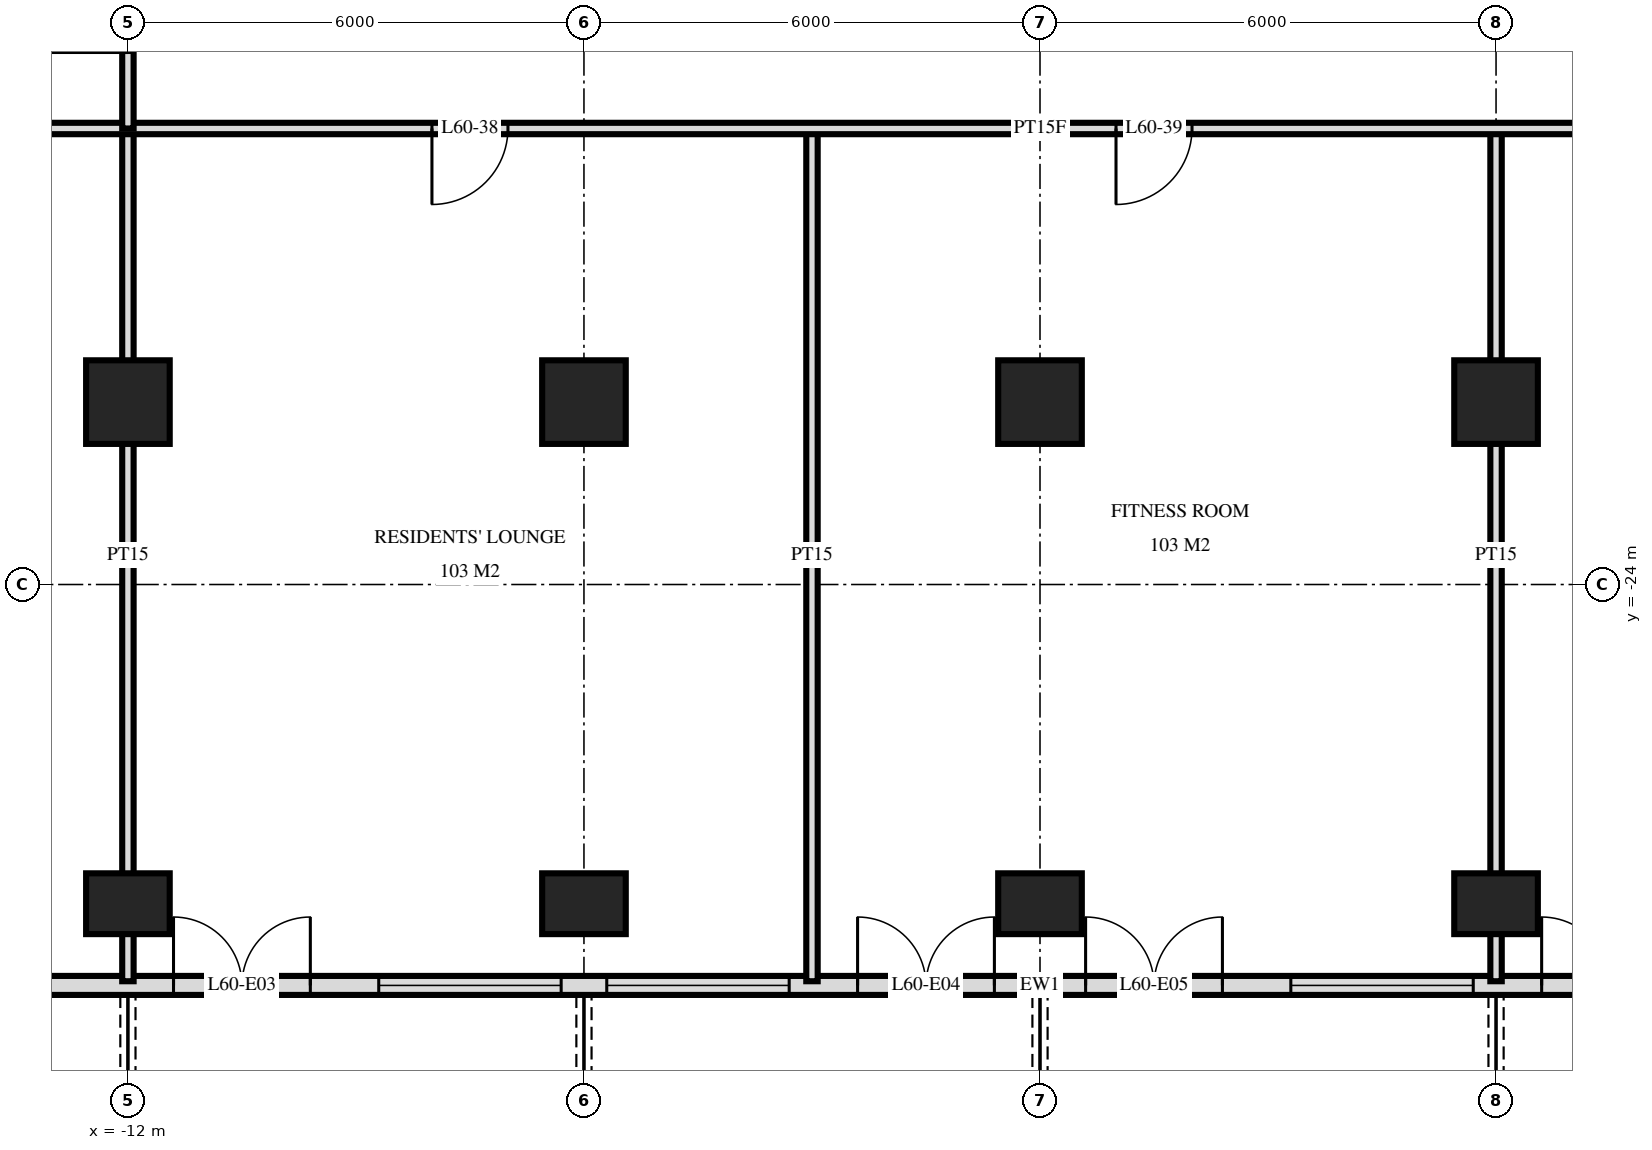
"""IFC4 building model, lengths in metres.
Left out: names, types, materials, properties, quantities, classifications, styles, units other than length and angle.
Written with IfcOpenShell. Run it as: python <this file> out.ifc"""

import sys

from ifc_helpers import new_model, si_unit, direction, frame, frame_2d, origin, origin_2d, place, context, subcontext, project, spatial, rectangle, extrude, element, fill, save


model = new_model("IFC4")
c1 = context("Model", 3, precision=1e-05, world=origin(), true_north=direction((0.0, 1.0)))
c2 = subcontext(c1, "Body", "Model", "MODEL_VIEW")
j1 = project(units=[si_unit("LENGTHUNIT", "METRE"), si_unit("PLANEANGLEUNIT", "RADIAN")], contexts=[c1])
p1 = place(None, origin())
s1 = spatial("IfcSite", under=j1, at=p1, CompositionType="ELEMENT")
p2 = place(p1, origin())
s2 = spatial("IfcBuilding", under=s1, at=p2, CompositionType="ELEMENT")
p3 = place(p2, frame((0.0, 0.0, 229.1)))
s3 = spatial("IfcBuildingStorey", under=s2, at=p3, CompositionType="ELEMENT", Elevation=229.1)
p4 = place(p3, frame((-12.0, -28.2, 0.0), z_axis=(0.0, 0.0, 1.0), x_axis=(1.0, 0.0, 0.0)))
e1 = element("IfcColumn", 1, at=p4, inside=s3, PredefinedType="COLUMN", context=c2, shape_type="SweptSolid", body=[
    extrude(rectangle(XDim=1.1, YDim=0.8, at=origin_2d()), origin(), (0.0, 0.0, 1.0), 3.5),
])
p5 = place(p3, frame((-12.0, -21.6, 0.0), z_axis=(0.0, 0.0, 1.0), x_axis=(1.0, 0.0, 0.0)))
e2 = element("IfcColumn", 2, at=p5, inside=s3, PredefinedType="COLUMN", context=c2, shape_type="SweptSolid", body=[
    extrude(rectangle(XDim=1.1, YDim=1.1, at=origin_2d()), origin(), (0.0, 0.0, 1.0), 3.5),
])
p6 = place(p3, frame((-6.0, -28.2, 0.0), z_axis=(0.0, 0.0, 1.0), x_axis=(1.0, 0.0, 0.0)))
e3 = element("IfcColumn", 3, at=p6, inside=s3, PredefinedType="COLUMN", context=c2, shape_type="SweptSolid", body=[
    extrude(rectangle(XDim=1.1, YDim=0.8, at=origin_2d()), origin(), (0.0, 0.0, 1.0), 3.5),
])
p7 = place(p3, frame((-6.0, -21.6, 0.0), z_axis=(0.0, 0.0, 1.0), x_axis=(1.0, 0.0, 0.0)))
e4 = element("IfcColumn", 4, at=p7, inside=s3, PredefinedType="COLUMN", context=c2, shape_type="SweptSolid", body=[
    extrude(rectangle(XDim=1.1, YDim=1.1, at=origin_2d()), origin(), (0.0, 0.0, 1.0), 3.5),
])
p8 = place(p3, frame((0.0, -28.2, 0.0), z_axis=(0.0, 0.0, 1.0), x_axis=(1.0, 0.0, 0.0)))
e5 = element("IfcColumn", 5, at=p8, inside=s3, PredefinedType="COLUMN", context=c2, shape_type="SweptSolid", body=[
    extrude(rectangle(XDim=1.1, YDim=0.8, at=origin_2d()), origin(), (0.0, 0.0, 1.0), 3.5),
])
p9 = place(p3, frame((0.0, -21.6, 0.0), z_axis=(0.0, 0.0, 1.0), x_axis=(1.0, 0.0, 0.0)))
e6 = element("IfcColumn", 6, at=p9, inside=s3, PredefinedType="COLUMN", context=c2, shape_type="SweptSolid", body=[
    extrude(rectangle(XDim=1.1, YDim=1.1, at=origin_2d()), origin(), (0.0, 0.0, 1.0), 3.5),
])
p10 = place(p3, frame((6.0, -28.2, 0.0), z_axis=(0.0, 0.0, 1.0), x_axis=(1.0, 0.0, 0.0)))
e7 = element("IfcColumn", 7, at=p10, inside=s3, PredefinedType="COLUMN", context=c2, shape_type="SweptSolid", body=[
    extrude(rectangle(XDim=1.1, YDim=0.8, at=origin_2d()), origin(), (0.0, 0.0, 1.0), 3.5),
])
p11 = place(p3, frame((6.0, -21.6, 0.0), z_axis=(0.0, 0.0, 1.0), x_axis=(1.0, 0.0, 0.0)))
e8 = element("IfcColumn", 8, at=p11, inside=s3, PredefinedType="COLUMN", context=c2, shape_type="SweptSolid", body=[
    extrude(rectangle(XDim=1.1, YDim=1.1, at=origin_2d()), origin(), (0.0, 0.0, 1.0), 3.5),
])
p12 = place(p3, frame((-22.475, -29.275, 0.0), z_axis=(0.0, 0.0, 1.0), x_axis=(1.0, 0.0, 0.0)))
e9 = element("IfcWall", 9, at=p12, inside=s3, PredefinedType="SOLIDWALL", context=c2, shape_type="SweptSolid", body=[
    extrude(rectangle(XDim=44.951, YDim=0.25, at=frame_2d((22.475, 0.0))), origin(), (0.0, 0.0, 1.0), 3.22),
])
p13 = place(p12, frame((0.575, 0.0, 0.0)))
e10 = element("IfcOpeningElement", 10, at=p13, cuts=e9, PredefinedType="OPENING", context=c2, shape_type="SweptSolid", body=[
    extrude(rectangle(XDim=1.8, YDim=2.4, at=frame_2d((0.9, 1.2))), frame((0.0, 0.135, 0.0), z_axis=(0.0, -1.0, 0.0), x_axis=(1.0, 0.0, 0.0)), (0.0, 0.0, 1.0), 0.27),
])
p14 = place(p12, frame((6.575, 0.0, 0.0)))
e11 = element("IfcOpeningElement", 11, at=p14, cuts=e9, PredefinedType="OPENING", context=c2, shape_type="SweptSolid", body=[
    extrude(rectangle(XDim=1.8, YDim=2.4, at=frame_2d((0.9, 1.2))), frame((0.0, 0.135, 0.0), z_axis=(0.0, -1.0, 0.0), x_axis=(1.0, 0.0, 0.0)), (0.0, 0.0, 1.0), 0.27),
])
p15 = place(p12, frame((11.075, 0.0, 0.0)))
e12 = element("IfcOpeningElement", 12, at=p15, cuts=e9, PredefinedType="OPENING", context=c2, shape_type="SweptSolid", body=[
    extrude(rectangle(XDim=1.8, YDim=2.4, at=frame_2d((0.9, 1.2))), frame((0.0, 0.135, 0.0), z_axis=(0.0, -1.0, 0.0), x_axis=(1.0, 0.0, 0.0)), (0.0, 0.0, 1.0), 0.27),
])
p16 = place(p12, frame((13.775, 0.0, 0.9)))
e13 = element("IfcOpeningElement", 13, at=p16, cuts=e9, PredefinedType="OPENING", context=c2, shape_type="SweptSolid", body=[
    extrude(rectangle(XDim=2.4, YDim=1.5, at=frame_2d((1.2, 0.75))), frame((0.0, 0.135, 0.0), z_axis=(0.0, -1.0, 0.0), x_axis=(1.0, 0.0, 0.0)), (0.0, 0.0, 1.0), 0.27),
])
p17 = place(p12, frame((16.775, 0.0, 0.9)))
e14 = element("IfcOpeningElement", 14, at=p17, cuts=e9, PredefinedType="OPENING", context=c2, shape_type="SweptSolid", body=[
    extrude(rectangle(XDim=2.4, YDim=1.5, at=frame_2d((1.2, 0.75))), frame((0.0, 0.135, 0.0), z_axis=(0.0, -1.0, 0.0), x_axis=(1.0, 0.0, 0.0)), (0.0, 0.0, 1.0), 0.27),
])
p18 = place(p12, frame((20.075, 0.0, 0.0)))
e15 = element("IfcOpeningElement", 15, at=p18, cuts=e9, PredefinedType="OPENING", context=c2, shape_type="SweptSolid", body=[
    extrude(rectangle(XDim=1.8, YDim=2.4, at=frame_2d((0.9, 1.2))), frame((0.0, 0.135, 0.0), z_axis=(0.0, -1.0, 0.0), x_axis=(1.0, 0.0, 0.0)), (0.0, 0.0, 1.0), 0.27),
])
p19 = place(p12, frame((23.075, 0.0, 0.0)))
e16 = element("IfcOpeningElement", 16, at=p19, cuts=e9, PredefinedType="OPENING", context=c2, shape_type="SweptSolid", body=[
    extrude(rectangle(XDim=1.8, YDim=2.4, at=frame_2d((0.9, 1.2))), frame((0.0, 0.135, 0.0), z_axis=(0.0, -1.0, 0.0), x_axis=(1.0, 0.0, 0.0)), (0.0, 0.0, 1.0), 0.27),
])
p20 = place(p12, frame((25.775, 0.0, 0.9)))
e17 = element("IfcOpeningElement", 17, at=p20, cuts=e9, PredefinedType="OPENING", context=c2, shape_type="SweptSolid", body=[
    extrude(rectangle(XDim=2.4, YDim=1.5, at=frame_2d((1.2, 0.75))), frame((0.0, 0.135, 0.0), z_axis=(0.0, -1.0, 0.0), x_axis=(1.0, 0.0, 0.0)), (0.0, 0.0, 1.0), 0.27),
])
p21 = place(p12, frame((29.075, 0.0, 0.0)))
e18 = element("IfcOpeningElement", 18, at=p21, cuts=e9, PredefinedType="OPENING", context=c2, shape_type="SweptSolid", body=[
    extrude(rectangle(XDim=1.8, YDim=2.4, at=frame_2d((0.9, 1.2))), frame((0.0, 0.135, 0.0), z_axis=(0.0, -1.0, 0.0), x_axis=(1.0, 0.0, 0.0)), (0.0, 0.0, 1.0), 0.27),
])
p22 = place(p12, frame((31.775, 0.0, 0.9)))
e19 = element("IfcOpeningElement", 19, at=p22, cuts=e9, PredefinedType="OPENING", context=c2, shape_type="SweptSolid", body=[
    extrude(rectangle(XDim=2.4, YDim=1.5, at=frame_2d((1.2, 0.75))), frame((0.0, 0.135, 0.0), z_axis=(0.0, -1.0, 0.0), x_axis=(1.0, 0.0, 0.0)), (0.0, 0.0, 1.0), 0.27),
])
p23 = place(p12, frame((35.075, 0.0, 0.0)))
e20 = element("IfcOpeningElement", 20, at=p23, cuts=e9, PredefinedType="OPENING", context=c2, shape_type="SweptSolid", body=[
    extrude(rectangle(XDim=1.8, YDim=2.4, at=frame_2d((0.9, 1.2))), frame((0.0, 0.135, 0.0), z_axis=(0.0, -1.0, 0.0), x_axis=(1.0, 0.0, 0.0)), (0.0, 0.0, 1.0), 0.27),
])
p24 = place(p12, frame((37.775, 0.0, 0.9)))
e21 = element("IfcOpeningElement", 21, at=p24, cuts=e9, PredefinedType="OPENING", context=c2, shape_type="SweptSolid", body=[
    extrude(rectangle(XDim=2.4, YDim=1.5, at=frame_2d((1.2, 0.75))), frame((0.0, 0.135, 0.0), z_axis=(0.0, -1.0, 0.0), x_axis=(1.0, 0.0, 0.0)), (0.0, 0.0, 1.0), 0.27),
])
p25 = place(p12, frame((41.075, 0.0, 0.0)))
e22 = element("IfcOpeningElement", 22, at=p25, cuts=e9, PredefinedType="OPENING", context=c2, shape_type="SweptSolid", body=[
    extrude(rectangle(XDim=1.8, YDim=2.4, at=frame_2d((0.9, 1.2))), frame((0.0, 0.135, 0.0), z_axis=(0.0, -1.0, 0.0), x_axis=(1.0, 0.0, 0.0)), (0.0, 0.0, 1.0), 0.27),
])
for number, where, z_axis, x_axis in (
    (23, (6.0, -29.22, 0.0), (0.0, 0.0, 1.0), (0.0, 1.0, 0.0)),
    (24, (-3.0, -29.22, 0.0), (0.0, 0.0, 1.0), (0.0, 1.0, 0.0)),
):
    element("IfcWall", number, at=place(p3, frame(where, z_axis=z_axis, x_axis=x_axis)), inside=s3, PredefinedType="PARTITIONING", context=c2, shape_type="SweptSolid", body=[
        extrude(rectangle(XDim=11.22, YDim=0.15, at=frame_2d((5.61, 0.0))), origin(), (0.0, 0.0, 1.0), 3.22),
    ])
p26 = place(p3, frame((-12.0, -18.0, 0.0), z_axis=(0.0, 0.0, 1.0), x_axis=(0.0, 1.0, 0.0)))
e25 = element("IfcWall", 25, at=p26, inside=s3, PredefinedType="PARTITIONING", context=c2, shape_type="SweptSolid", body=[
    extrude(rectangle(XDim=2.95, YDim=0.15, at=frame_2d((1.475, 0.0))), origin(), (0.0, 0.0, 1.0), 3.22),
])
p27 = place(p26, frame((1.0, 0.0, 0.0)))
e26 = element("IfcOpeningElement", 26, at=p27, cuts=e25, PredefinedType="OPENING", context=c2, shape_type="SweptSolid", body=[
    extrude(rectangle(XDim=1.0, YDim=2.1, at=frame_2d((0.5, 1.05))), frame((0.0, 0.085, 0.0), z_axis=(0.0, -1.0, 0.0), x_axis=(1.0, 0.0, 0.0)), (0.0, 0.0, 1.0), 0.17),
])
p28 = place(p3, frame((-12.0, -29.22, 0.0), z_axis=(0.0, 0.0, 1.0), x_axis=(0.0, 1.0, 0.0)))
e27 = element("IfcWall", 27, at=p28, inside=s3, PredefinedType="PARTITIONING", context=c2, shape_type="SweptSolid", body=[
    extrude(rectangle(XDim=11.22, YDim=0.15, at=frame_2d((5.61, 0.0))), origin(), (0.0, 0.0, 1.0), 3.22),
])
p29 = place(p3, frame((-26.82, -18.0, 0.0), z_axis=(0.0, 0.0, 1.0), x_axis=(1.0, 0.0, 0.0)))
e28 = element("IfcWall", 28, at=p29, inside=s3, PredefinedType="PARTITIONING", context=c2, shape_type="SweptSolid", body=[
    extrude(rectangle(XDim=53.64, YDim=0.15, at=frame_2d((26.82, 0.0))), origin(), (0.0, 0.0, 1.0), 3.22),
])
p30 = place(p29, frame((11.32, 0.0, 0.0)))
e29 = element("IfcOpeningElement", 29, at=p30, cuts=e28, PredefinedType="OPENING", context=c2, shape_type="SweptSolid", body=[
    extrude(rectangle(XDim=1.0, YDim=2.1, at=frame_2d((0.5, 1.05))), frame((0.0, 0.085, 0.0), z_axis=(0.0, -1.0, 0.0), x_axis=(1.0, 0.0, 0.0)), (0.0, 0.0, 1.0), 0.17),
])
p31 = place(p29, frame((3.22, 0.0, 0.0)))
e30 = element("IfcOpeningElement", 30, at=p31, cuts=e28, PredefinedType="OPENING", context=c2, shape_type="SweptSolid", body=[
    extrude(rectangle(XDim=1.0, YDim=2.1, at=frame_2d((0.5, 1.05))), frame((0.0, 0.085, 0.0), z_axis=(0.0, -1.0, 0.0), x_axis=(1.0, 0.0, 0.0)), (0.0, 0.0, 1.0), 0.17),
])
p32 = place(p29, frame((5.02, 0.0, 0.0)))
e31 = element("IfcOpeningElement", 31, at=p32, cuts=e28, PredefinedType="OPENING", context=c2, shape_type="SweptSolid", body=[
    extrude(rectangle(XDim=1.0, YDim=2.1, at=frame_2d((0.5, 1.05))), frame((0.0, 0.085, 0.0), z_axis=(0.0, -1.0, 0.0), x_axis=(1.0, 0.0, 0.0)), (0.0, 0.0, 1.0), 0.17),
])
p33 = place(p29, frame((38.97, 0.0, 0.0)))
e32 = element("IfcOpeningElement", 32, at=p33, cuts=e28, PredefinedType="OPENING", context=c2, shape_type="SweptSolid", body=[
    extrude(rectangle(XDim=1.0, YDim=2.1, at=frame_2d((0.5, 1.05))), frame((0.0, 0.085, 0.0), z_axis=(0.0, -1.0, 0.0), x_axis=(1.0, 0.0, 0.0)), (0.0, 0.0, 1.0), 0.17),
])
p34 = place(p29, frame((48.72, 0.0, 0.0)))
e33 = element("IfcOpeningElement", 33, at=p34, cuts=e28, PredefinedType="OPENING", context=c2, shape_type="SweptSolid", body=[
    extrude(rectangle(XDim=1.0, YDim=2.1, at=frame_2d((0.5, 1.05))), frame((0.0, 0.085, 0.0), z_axis=(0.0, -1.0, 0.0), x_axis=(1.0, 0.0, 0.0)), (0.0, 0.0, 1.0), 0.17),
])
p35 = place(p29, frame((46.92, 0.0, 0.0)))
e34 = element("IfcOpeningElement", 34, at=p35, cuts=e28, PredefinedType="OPENING", context=c2, shape_type="SweptSolid", body=[
    extrude(rectangle(XDim=1.0, YDim=2.1, at=frame_2d((0.5, 1.05))), frame((0.0, 0.085, 0.0), z_axis=(0.0, -1.0, 0.0), x_axis=(1.0, 0.0, 0.0)), (0.0, 0.0, 1.0), 0.17),
])
p36 = place(p29, frame((18.82, 0.0, 0.0)))
e35 = element("IfcOpeningElement", 35, at=p36, cuts=e28, PredefinedType="OPENING", context=c2, shape_type="SweptSolid", body=[
    extrude(rectangle(XDim=1.0, YDim=2.1, at=frame_2d((0.5, 1.05))), frame((0.0, 0.085, 0.0), z_axis=(0.0, -1.0, 0.0), x_axis=(1.0, 0.0, 0.0)), (0.0, 0.0, 1.0), 0.17),
])
p37 = place(p29, frame((27.82, 0.0, 0.0)))
e36 = element("IfcOpeningElement", 36, at=p37, cuts=e28, PredefinedType="OPENING", context=c2, shape_type="SweptSolid", body=[
    extrude(rectangle(XDim=1.0, YDim=2.1, at=frame_2d((0.5, 1.05))), frame((0.0, 0.085, 0.0), z_axis=(0.0, -1.0, 0.0), x_axis=(1.0, 0.0, 0.0)), (0.0, 0.0, 1.0), 0.17),
])
p38 = place(p29, frame((35.32, 0.0, 0.0)))
e37 = element("IfcOpeningElement", 37, at=p38, cuts=e28, PredefinedType="OPENING", context=c2, shape_type="SweptSolid", body=[
    extrude(rectangle(XDim=1.0, YDim=2.1, at=frame_2d((0.5, 1.05))), frame((0.0, 0.085, 0.0), z_axis=(0.0, -1.0, 0.0), x_axis=(1.0, 0.0, 0.0)), (0.0, 0.0, 1.0), 0.17),
])
p39 = place(p15, origin())
e38 = element("IfcDoor", 38, at=p39, inside=s3, OperationType="DOUBLE_DOOR_SINGLE_SWING", PredefinedType="DOOR", context=c2, shape_type="SweptSolid", body=[
    extrude(rectangle(XDim=1.8, YDim=2.4, at=frame_2d((0.9, 1.2))), frame((0.0, 0.025, 0.0), z_axis=(0.0, -1.0, 0.0), x_axis=(1.0, 0.0, 0.0)), (0.0, 0.0, 1.0), 0.05),
])
fill(e12, e38)
p40 = place(p16, origin())
e39 = element("IfcWindow", 39, at=p40, inside=s3, PartitioningType="SINGLE_PANEL", PredefinedType="WINDOW", context=c2, shape_type="SweptSolid", body=[
    extrude(rectangle(XDim=2.4, YDim=1.5, at=frame_2d((1.2, 0.75))), frame((0.0, 0.03, 0.0), z_axis=(0.0, -1.0, 0.0), x_axis=(1.0, 0.0, 0.0)), (0.0, 0.0, 1.0), 0.06),
])
fill(e13, e39)
p41 = place(p17, origin())
e40 = element("IfcWindow", 40, at=p41, inside=s3, PartitioningType="SINGLE_PANEL", PredefinedType="WINDOW", context=c2, shape_type="SweptSolid", body=[
    extrude(rectangle(XDim=2.4, YDim=1.5, at=frame_2d((1.2, 0.75))), frame((0.0, 0.03, 0.0), z_axis=(0.0, -1.0, 0.0), x_axis=(1.0, 0.0, 0.0)), (0.0, 0.0, 1.0), 0.06),
])
fill(e14, e40)
p42 = place(p18, origin())
e41 = element("IfcDoor", 41, at=p42, inside=s3, OperationType="DOUBLE_DOOR_SINGLE_SWING", PredefinedType="DOOR", context=c2, shape_type="SweptSolid", body=[
    extrude(rectangle(XDim=1.8, YDim=2.4, at=frame_2d((0.9, 1.2))), frame((0.0, 0.025, 0.0), z_axis=(0.0, -1.0, 0.0), x_axis=(1.0, 0.0, 0.0)), (0.0, 0.0, 1.0), 0.05),
])
fill(e15, e41)
p43 = place(p19, origin())
e42 = element("IfcDoor", 42, at=p43, inside=s3, OperationType="DOUBLE_DOOR_SINGLE_SWING", PredefinedType="DOOR", context=c2, shape_type="SweptSolid", body=[
    extrude(rectangle(XDim=1.8, YDim=2.4, at=frame_2d((0.9, 1.2))), frame((0.0, 0.025, 0.0), z_axis=(0.0, -1.0, 0.0), x_axis=(1.0, 0.0, 0.0)), (0.0, 0.0, 1.0), 0.05),
])
fill(e16, e42)
p44 = place(p20, origin())
e43 = element("IfcWindow", 43, at=p44, inside=s3, PartitioningType="SINGLE_PANEL", PredefinedType="WINDOW", context=c2, shape_type="SweptSolid", body=[
    extrude(rectangle(XDim=2.4, YDim=1.5, at=frame_2d((1.2, 0.75))), frame((0.0, 0.03, 0.0), z_axis=(0.0, -1.0, 0.0), x_axis=(1.0, 0.0, 0.0)), (0.0, 0.0, 1.0), 0.06),
])
fill(e17, e43)
p45 = place(p21, origin())
e44 = element("IfcDoor", 44, at=p45, inside=s3, OperationType="DOUBLE_DOOR_SINGLE_SWING", PredefinedType="DOOR", context=c2, shape_type="SweptSolid", body=[
    extrude(rectangle(XDim=1.8, YDim=2.4, at=frame_2d((0.9, 1.2))), frame((0.0, 0.025, 0.0), z_axis=(0.0, -1.0, 0.0), x_axis=(1.0, 0.0, 0.0)), (0.0, 0.0, 1.0), 0.05),
])
fill(e18, e44)
p46 = place(p36, frame((0.5, 0.0, 0.0), z_axis=(0.0, 0.0, 1.0), x_axis=(-1.0, 0.0, 0.0)))
e45 = element("IfcDoor", 45, at=p46, inside=s3, OperationType="SINGLE_SWING_LEFT", PredefinedType="DOOR", context=c2, shape_type="SweptSolid", body=[
    extrude(rectangle(XDim=1.0, YDim=2.1, at=frame_2d((0.0, 1.05))), frame((0.0, -0.025, 0.0), z_axis=(0.0, 1.0, 0.0), x_axis=(-1.0, 0.0, 0.0)), (0.0, 0.0, 1.0), 0.05),
])
fill(e35, e45)
p47 = place(p37, frame((0.5, 0.0, 0.0), z_axis=(0.0, 0.0, 1.0), x_axis=(-1.0, 0.0, 0.0)))
e46 = element("IfcDoor", 46, at=p47, inside=s3, OperationType="SINGLE_SWING_LEFT", PredefinedType="DOOR", context=c2, shape_type="SweptSolid", body=[
    extrude(rectangle(XDim=1.0, YDim=2.1, at=frame_2d((0.0, 1.05))), frame((0.0, -0.025, 0.0), z_axis=(0.0, 1.0, 0.0), x_axis=(-1.0, 0.0, 0.0)), (0.0, 0.0, 1.0), 0.05),
])
fill(e36, e46)
save(model, sys.argv[1])
